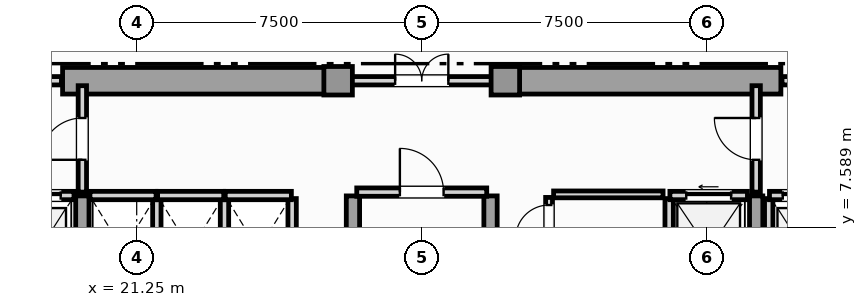
"""IFC4 building model, lengths in metres.
Left out: names, types, materials, properties, quantities, classifications, styles, units other than length and angle.
Written with IfcOpenShell. Run it as: python <this file> out.ifc"""

import sys

from ifc_helpers import new_model, si_unit, direction, frame, frame_2d, origin, origin_2d, place, context, subcontext, project, spatial, rectangle, extrude, element, fill, save


model = new_model("IFC4")
c1 = context("Model", 3, precision=1e-05, world=origin(), true_north=direction((0.0, 1.0)))
c2 = subcontext(c1, "Body", "Model", "MODEL_VIEW")
j1 = project(units=[si_unit("LENGTHUNIT", "METRE"), si_unit("PLANEANGLEUNIT", "RADIAN")], contexts=[c1])
p1 = place(None, origin())
s1 = spatial("IfcSite", under=j1, at=p1, CompositionType="ELEMENT")
p2 = place(p1, origin())
s2 = spatial("IfcBuilding", under=s1, at=p2, CompositionType="ELEMENT")
p3 = place(p2, frame((0.0, 0.0, 119.55)))
s3 = spatial("IfcBuildingStorey", under=s2, at=p3, CompositionType="ELEMENT", Elevation=119.55)
for number, where, z_axis, x_axis in (
    (1, (19.3, 11.45, 0.0), (0.0, 0.0, 1.0), (1.0, 0.0, 0.0)),
    (2, (30.9, 11.45, 0.0), (0.0, 0.0, 1.0), (1.0, 0.0, 0.0)),
):
    element("IfcWall", number, at=place(p3, frame(where, z_axis=z_axis, x_axis=x_axis)), inside=s3, PredefinedType="SHEAR", context=c2, shape_type="SweptSolid", body=[
        extrude(rectangle(XDim=7.3, YDim=0.7, at=frame_2d((3.65, 0.0))), origin(), (0.0, 0.0, 1.0), 3.6),
    ])
for number, where, z_axis, x_axis in (
    (3, (19.82, 0.92, 0.0), (0.0, 0.0, 1.0), (0.0, 1.0, 0.0)),
    (4, (26.94, 0.92, 0.0), (0.0, 0.0, 1.0), (0.0, 1.0, 0.0)),
    (5, (30.56, 0.92, 0.0), (0.0, 0.0, 1.0), (0.0, 1.0, 0.0)),
    (6, (37.55, 0.92, 0.0), (0.0, 0.0, 1.0), (0.0, 1.0, 0.0)),
):
    element("IfcWall", number, at=place(p3, frame(where, z_axis=z_axis, x_axis=x_axis)), inside=s3, PredefinedType="SHEAR", context=c2, shape_type="SweptSolid", body=[
        extrude(rectangle(XDim=7.5, YDim=0.35, at=frame_2d((3.75, 0.0))), origin(), (0.0, 0.0, 1.0), 3.6),
    ])
for number, where, z_axis, x_axis in (
    (7, (26.55, 11.45, 0.0), (0.0, 0.0, 1.0), (1.0, 0.0, 0.0)),
    (8, (30.95, 11.45, 0.0), (0.0, 0.0, 1.0), (1.0, 0.0, 0.0)),
):
    element("IfcColumn", number, at=place(p3, frame(where, z_axis=z_axis, x_axis=x_axis)), inside=s3, PredefinedType="COLUMN", context=c2, shape_type="SweptSolid", body=[
        extrude(rectangle(XDim=0.75, YDim=0.75, at=origin_2d()), origin(), (0.0, 0.0, 1.0), 3.85),
    ])
p4 = place(p3, frame((17.78, 8.43, 0.0), z_axis=(0.0, 0.0, 1.0), x_axis=(1.0, 0.0, 0.0)))
e9 = element("IfcWall", 9, at=p4, inside=s3, PredefinedType="SOLIDWALL", context=c2, shape_type="SweptSolid", body=[
    extrude(rectangle(XDim=1.82, YDim=0.22, at=frame_2d((0.91, 0.0))), origin(), (0.0, 0.0, 1.0), 3.6),
])
p5 = place(p4, frame((0.35, 0.0, 0.0)))
e10 = element("IfcOpeningElement", 10, at=p5, cuts=e9, PredefinedType="OPENING", context=c2, shape_type="SweptSolid", body=[
    extrude(rectangle(XDim=1.12, YDim=2.25, at=frame_2d((0.56, 1.125))), frame((0.0, 0.12, 0.0), z_axis=(0.0, -1.0, 0.0), x_axis=(1.0, 0.0, 0.0)), (0.0, 0.0, 1.0), 0.24),
])
p6 = place(p3, frame((37.88, 5.65, 0.0), z_axis=(0.0, 0.0, 1.0), x_axis=(0.0, 1.0, 0.0)))
e11 = element("IfcWall", 11, at=p6, inside=s3, PredefinedType="SOLIDWALL", context=c2, shape_type="SweptSolid", body=[
    extrude(rectangle(XDim=2.7, YDim=0.22, at=frame_2d((1.35, 0.0))), origin(), (0.0, 0.0, 1.0), 3.6),
])
p7 = place(p3, frame((37.9, 8.43, 0.0), z_axis=(0.0, 0.0, 1.0), x_axis=(1.0, 0.0, 0.0)))
e12 = element("IfcWall", 12, at=p7, inside=s3, PredefinedType="SOLIDWALL", context=c2, shape_type="SweptSolid", body=[
    extrude(rectangle(XDim=1.82, YDim=0.22, at=frame_2d((0.91, 0.0))), origin(), (0.0, 0.0, 1.0), 3.6),
])
p8 = place(p7, frame((0.35, 0.0, 0.0)))
e13 = element("IfcOpeningElement", 13, at=p8, cuts=e12, PredefinedType="OPENING", context=c2, shape_type="SweptSolid", body=[
    extrude(rectangle(XDim=1.12, YDim=2.25, at=frame_2d((0.56, 1.125))), frame((0.0, 0.12, 0.0), z_axis=(0.0, -1.0, 0.0), x_axis=(1.0, 0.0, 0.0)), (0.0, 0.0, 1.0), 0.24),
])
p9 = place(p3, frame((35.26, 5.65, 0.0), z_axis=(0.0, 0.0, 1.0), x_axis=(0.0, 1.0, 0.0)))
e14 = element("IfcWall", 14, at=p9, inside=s3, PredefinedType="SOLIDWALL", context=c2, shape_type="SweptSolid", body=[
    extrude(rectangle(XDim=2.7, YDim=0.22, at=frame_2d((1.35, 0.0))), origin(), (0.0, 0.0, 1.0), 3.6),
])
p10 = place(p3, frame((35.28, 8.43, 0.0), z_axis=(0.0, 0.0, 1.0), x_axis=(1.0, 0.0, 0.0)))
e15 = element("IfcWall", 15, at=p10, inside=s3, PredefinedType="SOLIDWALL", context=c2, shape_type="SweptSolid", body=[
    extrude(rectangle(XDim=2.04, YDim=0.22, at=frame_2d((1.02, 0.0))), origin(), (0.0, 0.0, 1.0), 3.6),
])
p11 = place(p10, frame((0.43, 0.0, 0.0)))
e16 = element("IfcOpeningElement", 16, at=p11, cuts=e15, PredefinedType="OPENING", context=c2, shape_type="SweptSolid", body=[
    extrude(rectangle(XDim=1.18, YDim=2.2, at=frame_2d((0.59, 1.1))), frame((0.0, 0.12, 0.0), z_axis=(0.0, -1.0, 0.0), x_axis=(1.0, 0.0, 0.0)), (0.0, 0.0, 1.0), 0.24),
])
p12 = place(p3, frame((21.78, 5.65, 0.0), z_axis=(0.0, 0.0, 1.0), x_axis=(0.0, 1.0, 0.0)))
e17 = element("IfcWall", 17, at=p12, inside=s3, PredefinedType="SOLIDWALL", context=c2, shape_type="SweptSolid", body=[
    extrude(rectangle(XDim=2.7, YDim=0.22, at=frame_2d((1.35, 0.0))), origin(), (0.0, 0.0, 1.0), 3.6),
])
p13 = place(p3, frame((20.02, 8.43, 0.0), z_axis=(0.0, 0.0, 1.0), x_axis=(1.0, 0.0, 0.0)))
e18 = element("IfcWall", 18, at=p13, inside=s3, PredefinedType="SOLIDWALL", context=c2, shape_type="SweptSolid", body=[
    extrude(rectangle(XDim=1.74, YDim=0.22, at=frame_2d((0.87, 0.0))), origin(), (0.0, 0.0, 1.0), 3.6),
])
p14 = place(p3, frame((23.56, 5.65, 0.0), z_axis=(0.0, 0.0, 1.0), x_axis=(0.0, 1.0, 0.0)))
e19 = element("IfcWall", 19, at=p14, inside=s3, PredefinedType="SOLIDWALL", context=c2, shape_type="SweptSolid", body=[
    extrude(rectangle(XDim=2.7, YDim=0.22, at=frame_2d((1.35, 0.0))), origin(), (0.0, 0.0, 1.0), 3.6),
])
p15 = place(p3, frame((21.8, 8.43, 0.0), z_axis=(0.0, 0.0, 1.0), x_axis=(1.0, 0.0, 0.0)))
e20 = element("IfcWall", 20, at=p15, inside=s3, PredefinedType="SOLIDWALL", context=c2, shape_type="SweptSolid", body=[
    extrude(rectangle(XDim=1.74, YDim=0.22, at=frame_2d((0.87, 0.0))), origin(), (0.0, 0.0, 1.0), 3.6),
])
p16 = place(p3, frame((25.34, 5.65, 0.0), z_axis=(0.0, 0.0, 1.0), x_axis=(0.0, 1.0, 0.0)))
e21 = element("IfcWall", 21, at=p16, inside=s3, PredefinedType="SOLIDWALL", context=c2, shape_type="SweptSolid", body=[
    extrude(rectangle(XDim=2.7, YDim=0.22, at=frame_2d((1.35, 0.0))), origin(), (0.0, 0.0, 1.0), 3.6),
])
p17 = place(p3, frame((23.58, 8.43, 0.0), z_axis=(0.0, 0.0, 1.0), x_axis=(1.0, 0.0, 0.0)))
e22 = element("IfcWall", 22, at=p17, inside=s3, PredefinedType="SOLIDWALL", context=c2, shape_type="SweptSolid", body=[
    extrude(rectangle(XDim=1.74, YDim=0.22, at=frame_2d((0.87, 0.0))), origin(), (0.0, 0.0, 1.0), 3.6),
])
p18 = place(p3, frame((27.04, 8.52, 0.0), z_axis=(0.0, 0.0, 1.0), x_axis=(1.0, 0.0, 0.0)))
e23 = element("IfcWall", 23, at=p18, inside=s3, PredefinedType="SOLIDWALL", context=c2, shape_type="SweptSolid", body=[
    extrude(rectangle(XDim=3.42, YDim=0.22, at=frame_2d((1.71, 0.0))), origin(), (0.0, 0.0, 1.0), 3.6),
])
p19 = place(p18, frame((1.135, 0.0, 0.0)))
e24 = element("IfcOpeningElement", 24, at=p19, cuts=e23, PredefinedType="OPENING", context=c2, shape_type="SweptSolid", body=[
    extrude(rectangle(XDim=1.15, YDim=2.2, at=frame_2d((0.575, 1.1))), frame((0.0, 0.12, 0.0), z_axis=(0.0, -1.0, 0.0), x_axis=(1.0, 0.0, 0.0)), (0.0, 0.0, 1.0), 0.24),
])
p20 = place(p3, frame((19.82, 8.52, 0.0), z_axis=(0.0, 0.0, 1.0), x_axis=(0.0, 1.0, 0.0)))
e25 = element("IfcWall", 25, at=p20, inside=s3, PredefinedType="SOLIDWALL", context=c2, shape_type="SweptSolid", body=[
    extrude(rectangle(XDim=2.8, YDim=0.22, at=frame_2d((1.4, 0.0))), origin(), (0.0, 0.0, 1.0), 3.055),
])
p21 = place(p20, frame((0.85, 0.0, 0.0)))
e26 = element("IfcOpeningElement", 26, at=p21, cuts=e25, PredefinedType="OPENING", context=c2, shape_type="SweptSolid", body=[
    extrude(rectangle(XDim=1.1, YDim=2.2, at=frame_2d((0.55, 1.1))), frame((0.0, 0.12, 0.0), z_axis=(0.0, -1.0, 0.0), x_axis=(1.0, 0.0, 0.0)), (0.0, 0.0, 1.0), 0.24),
])
p22 = place(p3, frame((37.55, 8.52, 0.0), z_axis=(0.0, 0.0, 1.0), x_axis=(0.0, 1.0, 0.0)))
e27 = element("IfcWall", 27, at=p22, inside=s3, PredefinedType="SOLIDWALL", context=c2, shape_type="SweptSolid", body=[
    extrude(rectangle(XDim=2.8, YDim=0.22, at=frame_2d((1.4, 0.0))), origin(), (0.0, 0.0, 1.0), 3.055),
])
p23 = place(p22, frame((0.85, 0.0, 0.0)))
e28 = element("IfcOpeningElement", 28, at=p23, cuts=e27, PredefinedType="OPENING", context=c2, shape_type="SweptSolid", body=[
    extrude(rectangle(XDim=1.1, YDim=2.2, at=frame_2d((0.55, 1.1))), frame((0.0, 0.12, 0.0), z_axis=(0.0, -1.0, 0.0), x_axis=(1.0, 0.0, 0.0)), (0.0, 0.0, 1.0), 0.24),
])
p24 = place(p3, frame((16.23, 11.45, 0.0), z_axis=(0.0, 0.0, 1.0), x_axis=(1.0, 0.0, 0.0)))
e29 = element("IfcWall", 29, at=p24, inside=s3, PredefinedType="SOLIDWALL", context=c2, shape_type="SweptSolid", body=[
    extrude(rectangle(XDim=3.04, YDim=0.22, at=frame_2d((1.52, 0.0))), origin(), (0.0, 0.0, 1.0), 3.6),
])
p25 = place(p24, frame((0.97, 0.0, 0.0)))
e30 = element("IfcOpeningElement", 30, at=p25, cuts=e29, PredefinedType="OPENING", context=c2, shape_type="SweptSolid", body=[
    extrude(rectangle(XDim=1.1, YDim=2.2, at=frame_2d((0.55, 1.1))), frame((0.0, 0.12, 0.0), z_axis=(0.0, -1.0, 0.0), x_axis=(1.0, 0.0, 0.0)), (0.0, 0.0, 1.0), 0.24),
])
p26 = place(p3, frame((26.63, 11.45, 0.0), z_axis=(0.0, 0.0, 1.0), x_axis=(1.0, 0.0, 0.0)))
e31 = element("IfcWall", 31, at=p26, inside=s3, PredefinedType="SOLIDWALL", context=c2, shape_type="SweptSolid", body=[
    extrude(rectangle(XDim=4.24, YDim=0.22, at=frame_2d((2.12, 0.0))), origin(), (0.0, 0.0, 1.0), 3.6),
])
p27 = place(p26, frame((1.42, 0.0, 0.0)))
e32 = element("IfcOpeningElement", 32, at=p27, cuts=e31, PredefinedType="OPENING", context=c2, shape_type="SweptSolid", body=[
    extrude(rectangle(XDim=1.4, YDim=2.2, at=frame_2d((0.7, 1.1))), frame((0.0, 0.12, 0.0), z_axis=(0.0, -1.0, 0.0), x_axis=(1.0, 0.0, 0.0)), (0.0, 0.0, 1.0), 0.24),
])
p28 = place(p3, frame((38.23, 11.45, 0.0), z_axis=(0.0, 0.0, 1.0), x_axis=(1.0, 0.0, 0.0)))
e33 = element("IfcWall", 33, at=p28, inside=s3, PredefinedType="SOLIDWALL", context=c2, shape_type="SweptSolid", body=[
    extrude(rectangle(XDim=3.04, YDim=0.22, at=frame_2d((1.52, 0.0))), origin(), (0.0, 0.0, 1.0), 3.6),
])
p29 = place(p28, frame((0.97, 0.0, 0.0)))
e34 = element("IfcOpeningElement", 34, at=p29, cuts=e33, PredefinedType="OPENING", context=c2, shape_type="SweptSolid", body=[
    extrude(rectangle(XDim=1.1, YDim=2.2, at=frame_2d((0.55, 1.1))), frame((0.0, 0.12, 0.0), z_axis=(0.0, -1.0, 0.0), x_axis=(1.0, 0.0, 0.0)), (0.0, 0.0, 1.0), 0.24),
])
p30 = place(p3, frame((32.1, 7.1, 0.0), z_axis=(0.0, 0.0, 1.0), x_axis=(0.0, 1.0, 0.0)))
e35 = element("IfcWall", 35, at=p30, inside=s3, PredefinedType="PARTITIONING", context=c2, shape_type="SweptSolid", body=[
    extrude(rectangle(XDim=1.28, YDim=0.18, at=frame_2d((0.64, 0.0))), origin(), (0.0, 0.0, 1.0), 3.6),
])
p31 = place(p30, frame((0.2, 0.0, 0.0)))
e36 = element("IfcOpeningElement", 36, at=p31, cuts=e35, PredefinedType="OPENING", context=c2, shape_type="SweptSolid", body=[
    extrude(rectangle(XDim=0.88, YDim=2.05, at=frame_2d((0.44, 1.025))), frame((0.0, 0.1, 0.0), z_axis=(0.0, -1.0, 0.0), x_axis=(1.0, 0.0, 0.0)), (0.0, 0.0, 1.0), 0.2),
])
p32 = place(p3, frame((32.22, 8.46, 0.0), z_axis=(0.0, 0.0, 1.0), x_axis=(1.0, 0.0, 0.0)))
e37 = element("IfcWall", 37, at=p32, inside=s3, PredefinedType="PARTITIONING", context=c2, shape_type="SweptSolid", body=[
    extrude(rectangle(XDim=2.88, YDim=0.18, at=frame_2d((1.44, 0.0))), origin(), (0.0, 0.0, 1.0), 3.6),
])
p33 = place(p5, origin())
e38 = element("IfcDoor", 38, at=p33, inside=s3, OperationType="SLIDING_TO_LEFT", PredefinedType="DOOR", context=c2, shape_type="SweptSolid", body=[
    extrude(rectangle(XDim=1.12, YDim=2.25, at=frame_2d((0.56, 1.125))), frame((0.0, 0.025, 0.0), z_axis=(0.0, -1.0, 0.0), x_axis=(1.0, 0.0, 0.0)), (0.0, 0.0, 1.0), 0.05),
])
fill(e10, e38)
p34 = place(p8, origin())
e39 = element("IfcDoor", 39, at=p34, inside=s3, OperationType="SLIDING_TO_RIGHT", PredefinedType="DOOR", context=c2, shape_type="SweptSolid", body=[
    extrude(rectangle(XDim=1.12, YDim=2.25, at=frame_2d((0.56, 1.125))), frame((0.0, 0.025, 0.0), z_axis=(0.0, -1.0, 0.0), x_axis=(1.0, 0.0, 0.0)), (0.0, 0.0, 1.0), 0.05),
])
fill(e13, e39)
p35 = place(p11, origin())
e40 = element("IfcDoor", 40, at=p35, inside=s3, OperationType="SLIDING_TO_LEFT", PredefinedType="DOOR", context=c2, shape_type="SweptSolid", body=[
    extrude(rectangle(XDim=1.18, YDim=2.2, at=frame_2d((0.59, 1.1))), frame((0.0, 0.025, 0.0), z_axis=(0.0, -1.0, 0.0), x_axis=(1.0, 0.0, 0.0)), (0.0, 0.0, 1.0), 0.05),
])
fill(e16, e40)
p36 = place(p19, origin())
e41 = element("IfcDoor", 41, at=p36, inside=s3, OperationType="SINGLE_SWING_LEFT", PredefinedType="DOOR", context=c2, shape_type="SweptSolid", body=[
    extrude(rectangle(XDim=1.15, YDim=2.2, at=frame_2d((0.575, 1.1))), frame((0.0, 0.025, 0.0), z_axis=(0.0, -1.0, 0.0), x_axis=(1.0, 0.0, 0.0)), (0.0, 0.0, 1.0), 0.05),
])
fill(e24, e41)
p37 = place(p21, origin())
e42 = element("IfcDoor", 42, at=p37, inside=s3, OperationType="SINGLE_SWING_LEFT", PredefinedType="DOOR", context=c2, shape_type="SweptSolid", body=[
    extrude(rectangle(XDim=1.1, YDim=2.2, at=frame_2d((0.55, 1.1))), frame((0.0, 0.025, 0.0), z_axis=(0.0, -1.0, 0.0), x_axis=(1.0, 0.0, 0.0)), (0.0, 0.0, 1.0), 0.05),
])
fill(e26, e42)
p38 = place(p23, origin())
e43 = element("IfcDoor", 43, at=p38, inside=s3, OperationType="SINGLE_SWING_RIGHT", PredefinedType="DOOR", context=c2, shape_type="SweptSolid", body=[
    extrude(rectangle(XDim=1.1, YDim=2.2, at=frame_2d((0.55, 1.1))), frame((0.0, 0.025, 0.0), z_axis=(0.0, -1.0, 0.0), x_axis=(1.0, 0.0, 0.0)), (0.0, 0.0, 1.0), 0.05),
])
fill(e28, e43)
p39 = place(p27, origin())
e44 = element("IfcDoor", 44, at=p39, inside=s3, OperationType="DOUBLE_DOOR_SINGLE_SWING", PredefinedType="DOOR", context=c2, shape_type="SweptSolid", body=[
    extrude(rectangle(XDim=1.4, YDim=2.2, at=frame_2d((0.7, 1.1))), frame((0.0, 0.025, 0.0), z_axis=(0.0, -1.0, 0.0), x_axis=(1.0, 0.0, 0.0)), (0.0, 0.0, 1.0), 0.05),
])
fill(e32, e44)
p40 = place(p31, origin())
e45 = element("IfcDoor", 45, at=p40, inside=s3, OperationType="SINGLE_SWING_LEFT", PredefinedType="DOOR", context=c2, shape_type="SweptSolid", body=[
    extrude(rectangle(XDim=0.88, YDim=2.05, at=frame_2d((0.44, 1.025))), frame((0.0, 0.025, 0.0), z_axis=(0.0, -1.0, 0.0), x_axis=(1.0, 0.0, 0.0)), (0.0, 0.0, 1.0), 0.05),
])
fill(e36, e45)
save(model, sys.argv[1])
